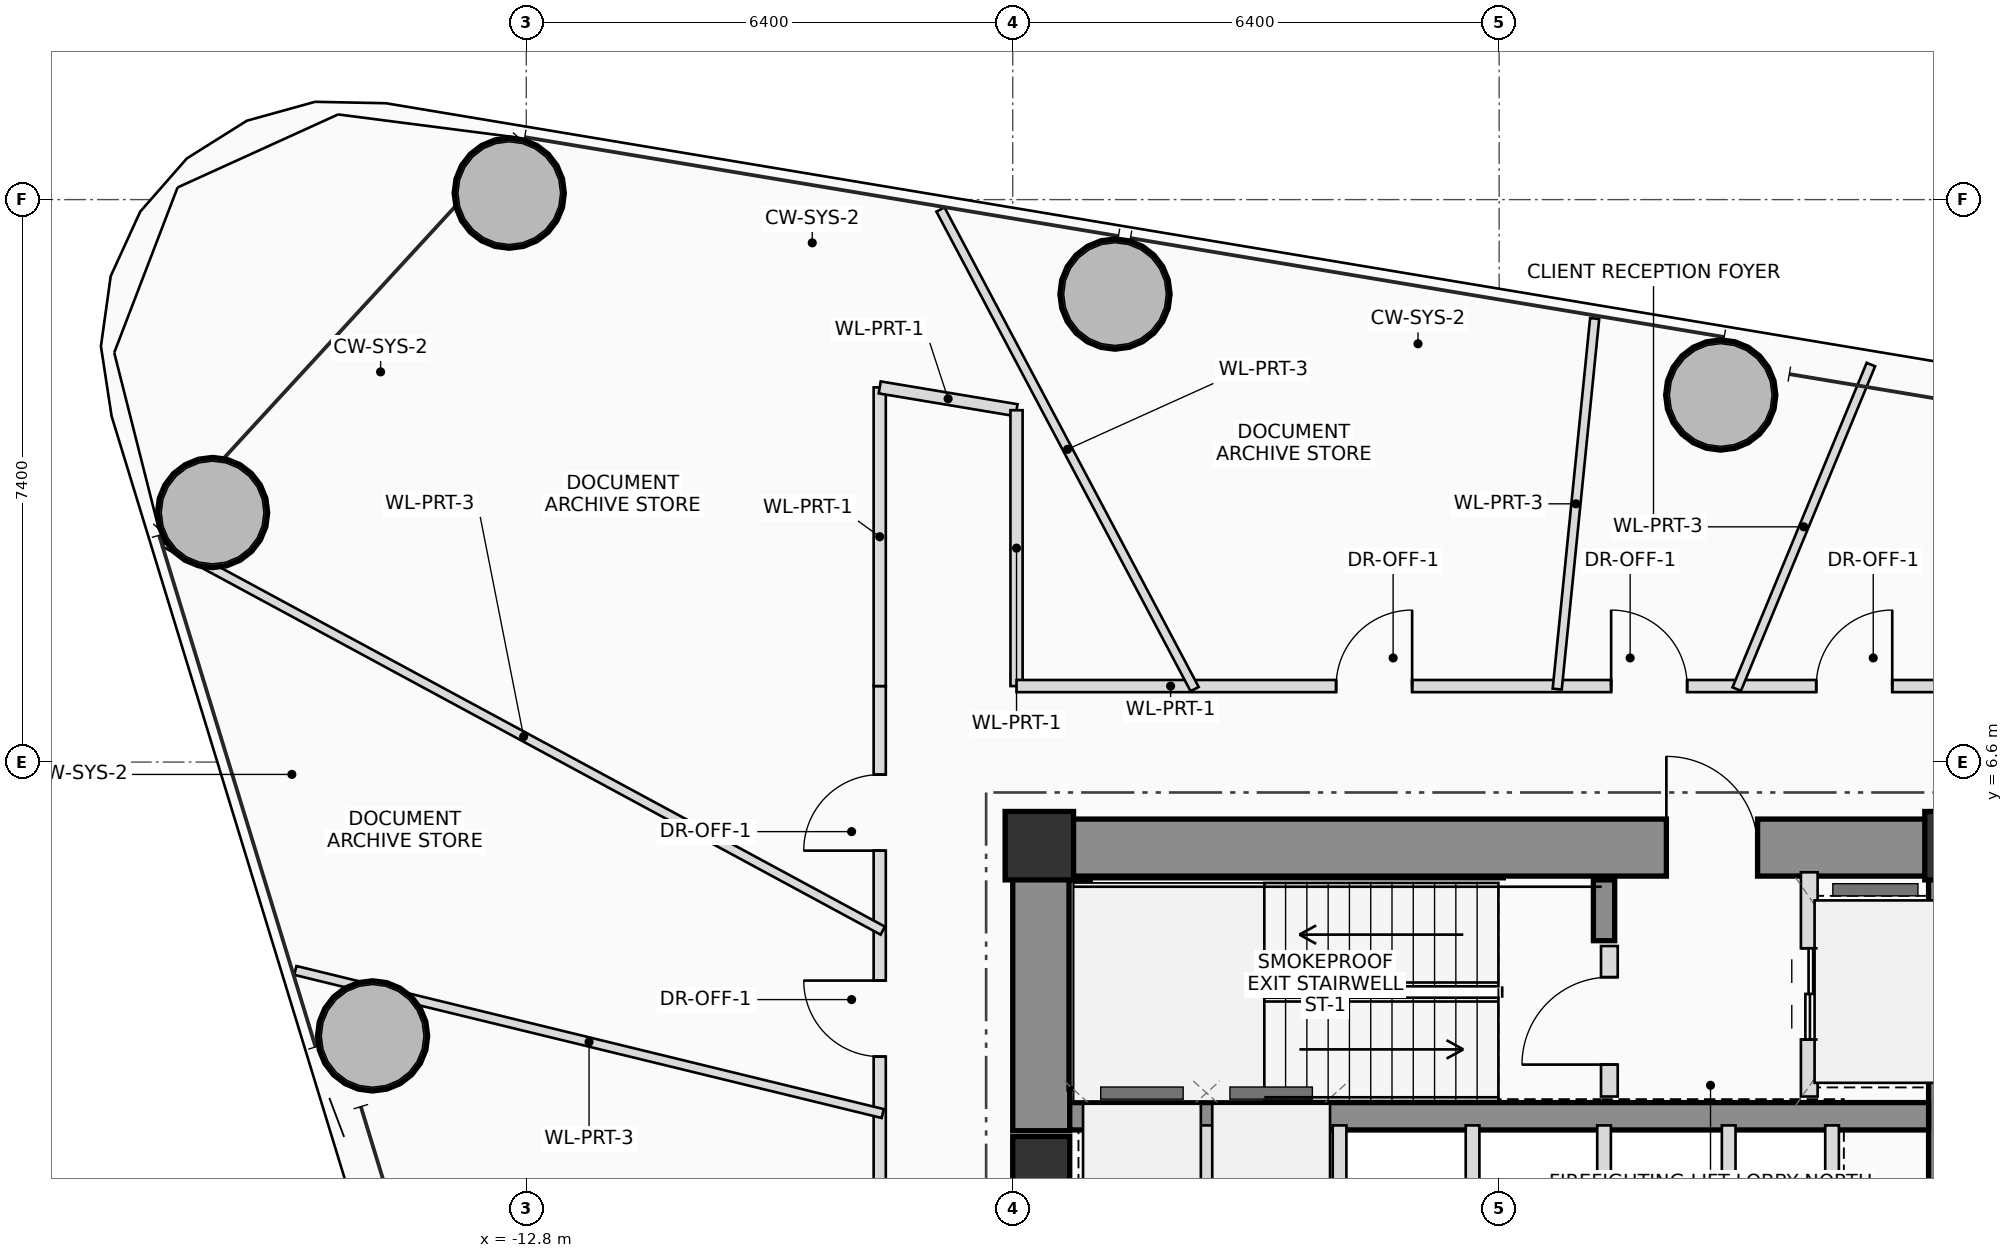
"""IFC4 building model, lengths in metres.
Left out: names, types, materials, properties, quantities, classifications, styles, units other than length and angle.
Written with IfcOpenShell. Run it as: python <this file> out.ifc"""

import sys

from ifc_helpers import new_model, si_unit, direction, frame, frame_2d, origin, origin_2d, place, context, subcontext, project, spatial, rectangle, hollow_circle, extrude, source, transform, mapped, element, fill, save


model = new_model("IFC4")
c1 = context("Model", 3, precision=1e-05, world=origin(), true_north=direction((0.0, 1.0)))
c2 = subcontext(c1, "Body", "Model", "MODEL_VIEW")
j1 = project(units=[si_unit("LENGTHUNIT", "METRE"), si_unit("PLANEANGLEUNIT", "RADIAN")], contexts=[c1])
p1 = place(None, origin())
s1 = spatial("IfcSite", under=j1, at=p1, CompositionType="ELEMENT")
p2 = place(p1, origin())
s2 = spatial("IfcBuilding", under=s1, at=p2, CompositionType="ELEMENT")
p3 = place(p2, frame((0.0, 0.0, 116.15)))
s3 = spatial("IfcBuildingStorey", under=s2, at=p3, CompositionType="ELEMENT", Elevation=116.15)
m1 = source(origin(), c2, "Body", "SweptSolid", [
    extrude(rectangle(XDim=0.9, YDim=0.9, at=origin_2d()), origin(), (0.0, 0.0, 1.0), 3.75),
])
for number, where, z_axis, x_axis in (
    (1, (6.05, 5.5, 0.0), (0.0, 0.0, 1.0), (1.0, 0.0, 0.0)),
    (2, (-6.05, 5.5, 0.0), (0.0, 0.0, 1.0), (1.0, 0.0, 0.0)),
):
    element("IfcColumn", number, at=place(p3, frame(where, z_axis=z_axis, x_axis=x_axis)), inside=s3, PredefinedType="COLUMN", context=c2, shape_type="MappedRepresentation", body=[
        mapped(m1, transform((0.0, 0.0, 0.0), scale=1.0)),
    ])
p4 = place(p3, frame((-6.4, 5.475, 0.0), z_axis=(0.0, 0.0, 1.0), x_axis=(1.0, 0.0, 0.0)))
e3 = element("IfcWall", 3, at=p4, inside=s3, PredefinedType="SHEAR", context=c2, shape_type="SweptSolid", body=[
    extrude(rectangle(XDim=12.8, YDim=0.75, at=frame_2d((6.4, 0.0))), origin(), (0.0, 0.0, 1.0), 3.75),
])
p5 = place(p4, frame((8.6, 0.0, 0.0)))
e4 = element("IfcOpeningElement", 4, at=p5, cuts=e3, PredefinedType="OPENING", context=c2, shape_type="SweptSolid", body=[
    extrude(rectangle(XDim=1.2, YDim=2.2, at=frame_2d((0.6, 1.1))), frame((0.0, 0.385, 0.0), z_axis=(0.0, -1.0, 0.0), x_axis=(1.0, 0.0, 0.0)), (0.0, 0.0, 1.0), 0.77),
])
p6 = place(p3, frame((6.025, -5.1, 0.0), z_axis=(0.0, 0.0, 1.0), x_axis=(0.0, 1.0, 0.0)))
e5 = element("IfcWall", 5, at=p6, inside=s3, PredefinedType="SHEAR", context=c2, shape_type="SweptSolid", body=[
    extrude(rectangle(XDim=10.2, YDim=0.75, at=frame_2d((5.1, 0.0))), origin(), (0.0, 0.0, 1.0), 3.75),
])
p7 = place(p3, frame((-6.025, 1.75, 0.0), z_axis=(0.0, 0.0, 1.0), x_axis=(0.0, 1.0, 0.0)))
e6 = element("IfcWall", 6, at=p7, inside=s3, PredefinedType="SHEAR", context=c2, shape_type="SweptSolid", body=[
    extrude(rectangle(XDim=3.35, YDim=0.75, at=frame_2d((1.675, 0.0))), origin(), (0.0, 0.0, 1.0), 3.75),
])
p8 = place(p3, frame((-5.65, 1.94, 0.0), z_axis=(0.0, 0.0, 1.0), x_axis=(1.0, 0.0, 0.0)))
e7 = element("IfcWall", 7, at=p8, inside=s3, PredefinedType="SHEAR", context=c2, shape_type="SweptSolid", body=[
    extrude(rectangle(XDim=11.3, YDim=0.36, at=frame_2d((5.65, 0.0))), origin(), (0.0, 0.0, 1.0), 3.75),
])
p9 = place(p3, frame((-5.52, 2.3, 0.0), z_axis=(0.0, 0.0, 1.0), x_axis=(0.0, 1.0, 0.0)))
e8 = element("IfcWall", 8, at=p9, inside=s3, PredefinedType="SHEAR", context=c2, shape_type="SweptSolid", body=[
    extrude(rectangle(XDim=2.75, YDim=0.28, at=frame_2d((1.375, 0.0))), origin(), (0.0, 0.0, 1.0), 3.75),
])
p10 = place(p3, frame((1.38, 4.25, 0.0), z_axis=(0.0, 0.0, 1.0), x_axis=(0.0, 1.0, 0.0)))
e9 = element("IfcWall", 9, at=p10, inside=s3, PredefinedType="SHEAR", context=c2, shape_type="SweptSolid", body=[
    extrude(rectangle(XDim=0.8, YDim=0.28, at=frame_2d((0.4, 0.0))), origin(), (0.0, 0.0, 1.0), 3.75),
])
m2 = source(origin(), c2, "Body", "SweptSolid", [
    extrude(rectangle(XDim=0.75, YDim=0.75, at=origin_2d()), origin(), (0.0, 0.0, 1.0), 3.75),
])
p11 = place(p3, frame((-6.025, 1.3, 0.0), z_axis=(0.0, 0.0, 1.0), x_axis=(1.0, 0.0, 0.0)))
e10 = element("IfcColumn", 10, at=p11, inside=s3, PredefinedType="COLUMN", context=c2, shape_type="MappedRepresentation", body=[
    mapped(m2, transform((0.0, 0.0, 0.0), scale=1.0)),
])
m3 = source(origin(), c2, "Body", "SweptSolid", [
    extrude(hollow_circle(Radius=0.725, WallThickness=0.05, at=origin_2d()), origin(), (0.0, 0.0, 1.0), 3.75),
])
for number, where, z_axis, x_axis in (
    (11, (2.915, 11.429, 0.0), (0.0, 0.0, 1.0), (1.0, 0.0, 0.0)),
    (12, (-5.054, 12.757, 0.0), (0.0, 0.0, 1.0), (1.0, 0.0, 0.0)),
    (13, (-13.024, 14.085, 0.0), (0.0, 0.0, 1.0), (1.0, 0.0, 0.0)),
    (14, (-16.927, 9.883, 0.0), (0.0, 0.0, 1.0), (1.0, 0.0, 0.0)),
    (15, (-14.823, 2.998, 0.0), (0.0, 0.0, 1.0), (1.0, 0.0, 0.0)),
):
    element("IfcColumn", number, at=place(p3, frame(where, z_axis=z_axis, x_axis=x_axis)), inside=s3, PredefinedType="COLUMN", context=c2, shape_type="MappedRepresentation", body=[
        mapped(m3, transform((0.0, 0.0, 0.0), scale=1.0)),
    ])
p12 = place(p3, frame((1.45, 2.2, 0.0), z_axis=(0.0, 0.0, 1.0), x_axis=(0.0, 1.0, 0.0)))
e16 = element("IfcWall", 16, at=p12, inside=s3, PredefinedType="PLUMBINGWALL", context=c2, shape_type="SweptSolid", body=[
    extrude(rectangle(XDim=1.98, YDim=0.22, at=frame_2d((0.99, 0.0))), origin(), (0.0, 0.0, 1.0), 3.51),
])
p13 = place(p12, frame((0.42, 0.0, 0.0)))
e17 = element("IfcOpeningElement", 17, at=p13, cuts=e16, PredefinedType="OPENING", context=c2, shape_type="SweptSolid", body=[
    extrude(rectangle(XDim=1.15, YDim=2.15, at=frame_2d((0.575, 1.075))), frame((0.0, 0.12, 0.0), z_axis=(0.0, -1.0, 0.0), x_axis=(1.0, 0.0, 0.0)), (0.0, 0.0, 1.0), 0.24),
])
p14 = place(p3, frame((4.08, 2.2, 0.0), z_axis=(0.0, 0.0, 1.0), x_axis=(0.0, 1.0, 0.0)))
e18 = element("IfcWall", 18, at=p14, inside=s3, PredefinedType="PLUMBINGWALL", context=c2, shape_type="SweptSolid", body=[
    extrude(rectangle(XDim=2.95, YDim=0.22, at=frame_2d((1.475, 0.0))), origin(), (0.0, 0.0, 1.0), 3.51),
])
p15 = place(p14, frame((0.75, 0.0, 0.0)))
e19 = element("IfcOpeningElement", 19, at=p15, cuts=e18, PredefinedType="OPENING", context=c2, shape_type="SweptSolid", body=[
    extrude(rectangle(XDim=1.2, YDim=2.25, at=frame_2d((0.6, 1.125))), frame((0.0, 0.12, 0.0), z_axis=(0.0, -1.0, 0.0), x_axis=(1.0, 0.0, 0.0)), (0.0, 0.0, 1.0), 0.24),
])
for number, where, z_axis, x_axis in (
    (20, (-3.85, 0.84, 0.0), (0.0, 0.0, 1.0), (0.0, 1.0, 0.0)),
    (21, (-2.1, 0.84, 0.0), (0.0, 0.0, 1.0), (0.0, 1.0, 0.0)),
    (22, (-0.35, 0.84, 0.0), (0.0, 0.0, 1.0), (0.0, 1.0, 0.0)),
    (23, (1.38, 0.84, 0.0), (0.0, 0.0, 1.0), (0.0, 1.0, 0.0)),
    (24, (3.02, 0.84, 0.0), (0.0, 0.0, 1.0), (0.0, 1.0, 0.0)),
    (25, (4.38, 0.84, 0.0), (0.0, 0.0, 1.0), (0.0, 1.0, 0.0)),
):
    element("IfcWall", number, at=place(p3, frame(where, z_axis=z_axis, x_axis=x_axis)), inside=s3, PredefinedType="PLUMBINGWALL", context=c2, shape_type="SweptSolid", body=[
        extrude(rectangle(XDim=0.98, YDim=0.18, at=frame_2d((0.49, 0.0))), origin(), (0.0, 0.0, 1.0), 3.51),
    ])
p16 = place(p3, frame((-8.15, -7.6, 0.0), z_axis=(0.0, 0.0, 1.0), x_axis=(0.0, 1.0, 0.0)))
e26 = element("IfcWall", 26, at=p16, inside=s3, PredefinedType="PARTITIONING", context=c2, shape_type="SweptSolid", body=[
    extrude(rectangle(XDim=15.2, YDim=0.16, at=frame_2d((7.6, 0.0))), origin(), (0.0, 0.0, 1.0), 2.815),
])
p17 = place(p16, frame((2.29, 0.0, 0.0)))
e27 = element("IfcOpeningElement", 27, at=p17, cuts=e26, PredefinedType="OPENING", context=c2, shape_type="SweptSolid", body=[
    extrude(rectangle(XDim=1.0, YDim=2.25, at=frame_2d((0.5, 1.125))), frame((0.0, 0.09, 0.0), z_axis=(0.0, -1.0, 0.0), x_axis=(1.0, 0.0, 0.0)), (0.0, 0.0, 1.0), 0.18),
])
p18 = place(p16, frame((7.0, 0.0, 0.0)))
e28 = element("IfcOpeningElement", 28, at=p18, cuts=e26, PredefinedType="OPENING", context=c2, shape_type="SweptSolid", body=[
    extrude(rectangle(XDim=1.0, YDim=2.25, at=frame_2d((0.5, 1.125))), frame((0.0, 0.09, 0.0), z_axis=(0.0, -1.0, 0.0), x_axis=(1.0, 0.0, 0.0)), (0.0, 0.0, 1.0), 0.18),
])
p19 = place(p16, frame((10.325, 0.0, 0.0)))
e29 = element("IfcOpeningElement", 29, at=p19, cuts=e26, PredefinedType="OPENING", context=c2, shape_type="SweptSolid", body=[
    extrude(rectangle(XDim=1.0, YDim=2.25, at=frame_2d((0.5, 1.125))), frame((0.0, 0.09, 0.0), z_axis=(0.0, -1.0, 0.0), x_axis=(1.0, 0.0, 0.0)), (0.0, 0.0, 1.0), 0.18),
])
p20 = place(p16, frame((13.035, 0.0, 0.0)))
e30 = element("IfcOpeningElement", 30, at=p20, cuts=e26, PredefinedType="OPENING", context=c2, shape_type="SweptSolid", body=[
    extrude(rectangle(XDim=1.0, YDim=2.25, at=frame_2d((0.5, 1.125))), frame((0.0, 0.09, 0.0), z_axis=(0.0, -1.0, 0.0), x_axis=(1.0, 0.0, 0.0)), (0.0, 0.0, 1.0), 0.18),
])
p21 = place(p3, frame((-8.15, 7.6, 0.0), z_axis=(0.0, 0.0, 1.0), x_axis=(0.0, 1.0, 0.0)))
e31 = element("IfcWall", 31, at=p21, inside=s3, PredefinedType="PARTITIONING", context=c2, shape_type="SweptSolid", body=[
    extrude(rectangle(XDim=3.929, YDim=0.16, at=frame_2d((1.964, 0.0))), origin(), (0.0, 0.0, 1.0), 2.815),
])
p22 = place(p3, frame((-8.15, 11.529, 0.0), z_axis=(0.0, 0.0, 1.0), x_axis=(0.986408385389, -0.164312194419, 0.0)))
e32 = element("IfcWall", 32, at=p22, inside=s3, PredefinedType="PARTITIONING", context=c2, shape_type="SweptSolid", body=[
    extrude(rectangle(XDim=1.825, YDim=0.16, at=frame_2d((0.912, 0.0))), origin(), (0.0, 0.0, 1.0), 3.51),
])
p23 = place(p3, frame((-6.35, 11.229, 0.0), z_axis=(0.0, 0.0, 1.0), x_axis=(0.0, -1.0, 0.0)))
e33 = element("IfcWall", 33, at=p23, inside=s3, PredefinedType="PARTITIONING", context=c2, shape_type="SweptSolid", body=[
    extrude(rectangle(XDim=3.629, YDim=0.16, at=frame_2d((1.814, 0.0))), origin(), (0.0, 0.0, 1.0), 3.015),
])
p24 = place(p3, frame((-6.35, 7.6, 0.0), z_axis=(0.0, 0.0, 1.0), x_axis=(1.0, 0.0, 0.0)))
e34 = element("IfcWall", 34, at=p24, inside=s3, PredefinedType="PARTITIONING", context=c2, shape_type="SweptSolid", body=[
    extrude(rectangle(XDim=12.7, YDim=0.16, at=frame_2d((6.35, 0.0))), origin(), (0.0, 0.0, 1.0), 2.815),
])
p25 = place(p24, frame((4.205, 0.0, 0.0)))
e35 = element("IfcOpeningElement", 35, at=p25, cuts=e34, PredefinedType="OPENING", context=c2, shape_type="SweptSolid", body=[
    extrude(rectangle(XDim=1.0, YDim=2.25, at=frame_2d((0.5, 1.125))), frame((0.0, 0.09, 0.0), z_axis=(0.0, -1.0, 0.0), x_axis=(1.0, 0.0, 0.0)), (0.0, 0.0, 1.0), 0.18),
])
p26 = place(p24, frame((7.823, 0.0, 0.0)))
e36 = element("IfcOpeningElement", 36, at=p26, cuts=e34, PredefinedType="OPENING", context=c2, shape_type="SweptSolid", body=[
    extrude(rectangle(XDim=1.0, YDim=2.25, at=frame_2d((0.5, 1.125))), frame((0.0, 0.09, 0.0), z_axis=(0.0, -1.0, 0.0), x_axis=(1.0, 0.0, 0.0)), (0.0, 0.0, 1.0), 0.18),
])
p27 = place(p24, frame((10.522, 0.0, 0.0)))
e37 = element("IfcOpeningElement", 37, at=p27, cuts=e34, PredefinedType="OPENING", context=c2, shape_type="SweptSolid", body=[
    extrude(rectangle(XDim=1.0, YDim=2.25, at=frame_2d((0.5, 1.125))), frame((0.0, 0.09, 0.0), z_axis=(0.0, -1.0, 0.0), x_axis=(1.0, 0.0, 0.0)), (0.0, 0.0, 1.0), 0.18),
])
p28 = place(p3, frame((3.125, 7.56, 0.0), z_axis=(0.0, 0.0, 1.0), x_axis=(0.382088862778, 0.924125587212, 0.0)))
e38 = element("IfcWall", 38, at=p28, inside=s3, PredefinedType="PARTITIONING", context=c2, shape_type="SweptSolid", body=[
    extrude(rectangle(XDim=4.62, YDim=0.12, at=frame_2d((2.31, 0.0))), origin(), (0.0, 0.0, 1.0), 2.815),
])
p29 = place(p3, frame((0.764, 7.56, 0.0), z_axis=(0.0, 0.0, 1.0), x_axis=(0.100495218626, 0.994937541272, 0.0)))
e39 = element("IfcWall", 39, at=p29, inside=s3, PredefinedType="PARTITIONING", context=c2, shape_type="SweptSolid", body=[
    extrude(rectangle(XDim=4.9, YDim=0.12, at=frame_2d((2.45, 0.0))), origin(), (0.0, 0.0, 1.0), 2.975),
])
p30 = place(p3, frame((-4.007, 7.56, 0.0), z_axis=(0.0, 0.0, 1.0), x_axis=(-0.468285095747, 0.883577426772, 0.0)))
e40 = element("IfcWall", 40, at=p30, inside=s3, PredefinedType="PARTITIONING", context=c2, shape_type="SweptSolid", body=[
    extrude(rectangle(XDim=7.141, YDim=0.12, at=frame_2d((3.57, 0.0))), origin(), (0.0, 0.0, 1.0), 2.815),
])
p31 = place(p3, frame((-8.11, 4.382, 0.0), z_axis=(0.0, 0.0, 1.0), x_axis=(-0.879765097161, 0.47540863877, 0.0)))
e41 = element("IfcWall", 41, at=p31, inside=s3, PredefinedType="PARTITIONING", context=c2, shape_type="SweptSolid", body=[
    extrude(rectangle(XDim=10.741, YDim=0.12, at=frame_2d((5.371, 0.0))), origin(), (0.0, 0.0, 1.0), 2.815),
])
p32 = place(p3, frame((-8.11, 1.976, 0.0), z_axis=(0.0, 0.0, 1.0), x_axis=(-0.971576662732, 0.236725132665, 0.0)))
e42 = element("IfcWall", 42, at=p32, inside=s3, PredefinedType="PARTITIONING", context=c2, shape_type="SweptSolid", body=[
    extrude(rectangle(XDim=7.955, YDim=0.12, at=frame_2d((3.977, 0.0))), origin(), (0.0, 0.0, 1.0), 2.815),
])
p33 = place(p5, origin())
e43 = element("IfcDoor", 43, at=p33, inside=s3, OperationType="SINGLE_SWING_LEFT", PredefinedType="DOOR", context=c2, shape_type="SweptSolid", body=[
    extrude(rectangle(XDim=1.2, YDim=2.2, at=frame_2d((0.6, 1.1))), frame((0.0, 0.025, 0.0), z_axis=(0.0, -1.0, 0.0), x_axis=(1.0, 0.0, 0.0)), (0.0, 0.0, 1.0), 0.05),
])
fill(e4, e43)
p34 = place(p13, origin())
e44 = element("IfcDoor", 44, at=p34, inside=s3, OperationType="SINGLE_SWING_LEFT", PredefinedType="DOOR", context=c2, shape_type="SweptSolid", body=[
    extrude(rectangle(XDim=1.15, YDim=2.15, at=frame_2d((0.575, 1.075))), frame((0.0, 0.025, 0.0), z_axis=(0.0, -1.0, 0.0), x_axis=(1.0, 0.0, 0.0)), (0.0, 0.0, 1.0), 0.05),
])
fill(e17, e44)
p35 = place(p15, origin())
e45 = element("IfcDoor", 45, at=p35, inside=s3, OperationType="DOUBLE_DOOR_SLIDING", PredefinedType="DOOR", context=c2, shape_type="SweptSolid", body=[
    extrude(rectangle(XDim=1.2, YDim=2.25, at=frame_2d((0.6, 1.125))), frame((0.0, 0.025, 0.0), z_axis=(0.0, -1.0, 0.0), x_axis=(1.0, 0.0, 0.0)), (0.0, 0.0, 1.0), 0.05),
])
fill(e19, e45)
p36 = place(p19, origin())
e46 = element("IfcDoor", 46, at=p36, inside=s3, OperationType="SINGLE_SWING_RIGHT", PredefinedType="DOOR", context=c2, shape_type="SweptSolid", body=[
    extrude(rectangle(XDim=1.0, YDim=2.25, at=frame_2d((0.5, 1.125))), frame((0.0, 0.025, 0.0), z_axis=(0.0, -1.0, 0.0), x_axis=(1.0, 0.0, 0.0)), (0.0, 0.0, 1.0), 0.05),
])
fill(e29, e46)
p37 = place(p20, origin())
e47 = element("IfcDoor", 47, at=p37, inside=s3, OperationType="SINGLE_SWING_LEFT", PredefinedType="DOOR", context=c2, shape_type="SweptSolid", body=[
    extrude(rectangle(XDim=1.0, YDim=2.25, at=frame_2d((0.5, 1.125))), frame((0.0, 0.025, 0.0), z_axis=(0.0, -1.0, 0.0), x_axis=(1.0, 0.0, 0.0)), (0.0, 0.0, 1.0), 0.05),
])
fill(e30, e47)
p38 = place(p25, origin())
e48 = element("IfcDoor", 48, at=p38, inside=s3, OperationType="SINGLE_SWING_RIGHT", PredefinedType="DOOR", context=c2, shape_type="SweptSolid", body=[
    extrude(rectangle(XDim=1.0, YDim=2.25, at=frame_2d((0.5, 1.125))), frame((0.0, 0.025, 0.0), z_axis=(0.0, -1.0, 0.0), x_axis=(1.0, 0.0, 0.0)), (0.0, 0.0, 1.0), 0.05),
])
fill(e35, e48)
p39 = place(p26, origin())
e49 = element("IfcDoor", 49, at=p39, inside=s3, OperationType="SINGLE_SWING_LEFT", PredefinedType="DOOR", context=c2, shape_type="SweptSolid", body=[
    extrude(rectangle(XDim=1.0, YDim=2.25, at=frame_2d((0.5, 1.125))), frame((0.0, 0.025, 0.0), z_axis=(0.0, -1.0, 0.0), x_axis=(1.0, 0.0, 0.0)), (0.0, 0.0, 1.0), 0.05),
])
fill(e36, e49)
p40 = place(p27, origin())
e50 = element("IfcDoor", 50, at=p40, inside=s3, OperationType="SINGLE_SWING_RIGHT", PredefinedType="DOOR", context=c2, shape_type="SweptSolid", body=[
    extrude(rectangle(XDim=1.0, YDim=2.25, at=frame_2d((0.5, 1.125))), frame((0.0, 0.025, 0.0), z_axis=(0.0, -1.0, 0.0), x_axis=(1.0, 0.0, 0.0)), (0.0, 0.0, 1.0), 0.05),
])
fill(e37, e50)
save(model, sys.argv[1])
